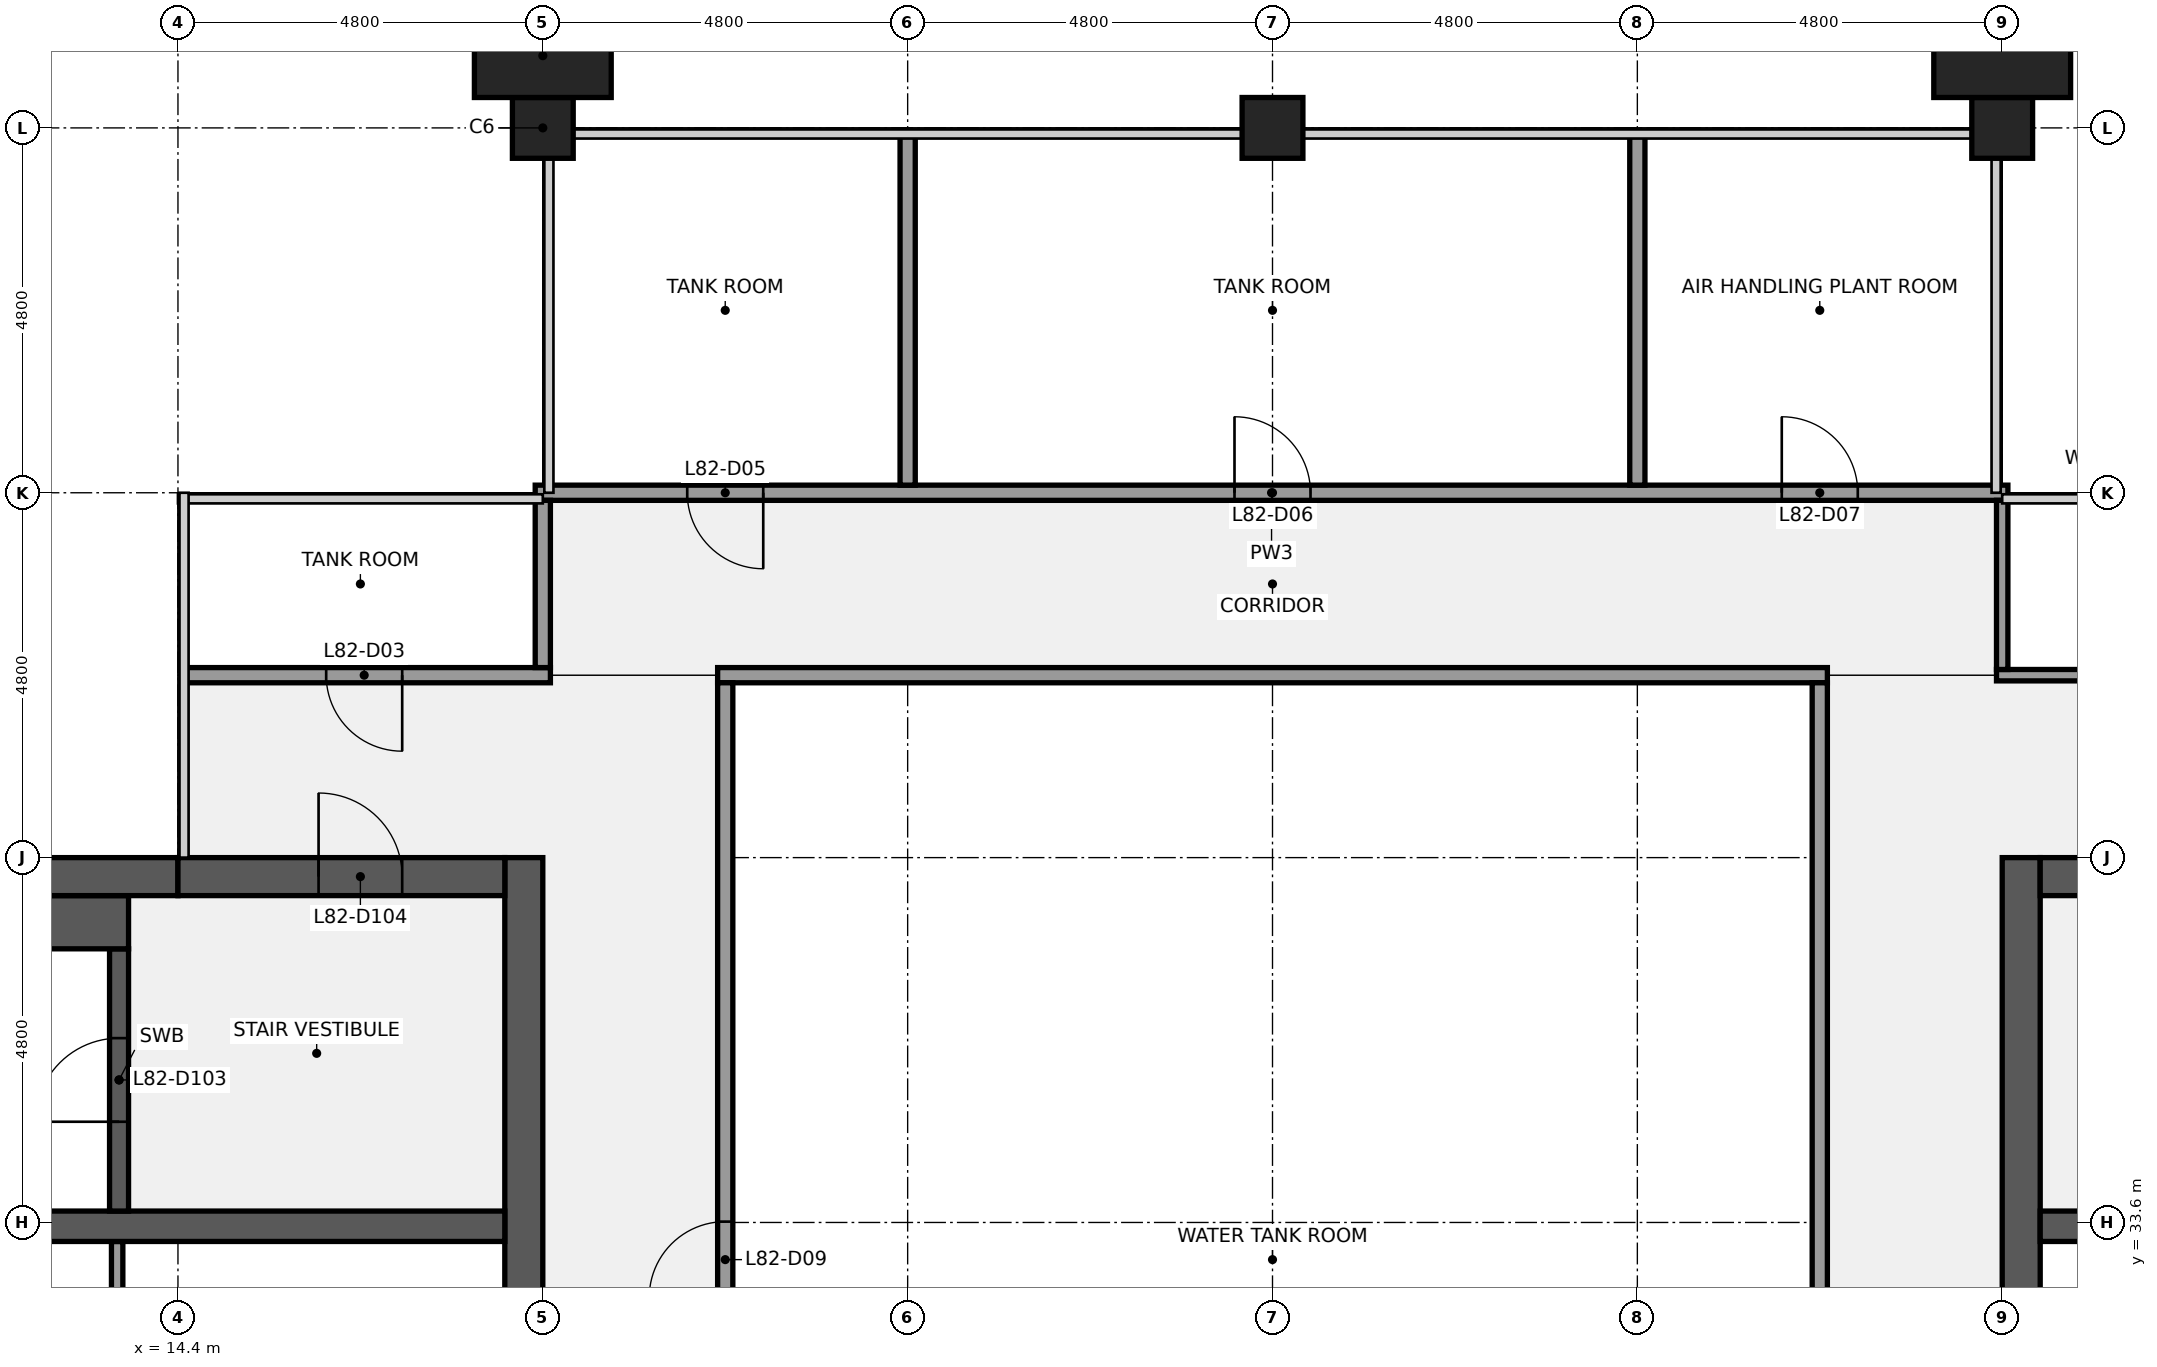
"""IFC4 building model, lengths in metres.
Left out: names, types, materials, properties, quantities, classifications, styles, units other than length and angle.
Written with IfcOpenShell. Run it as: python <this file> out.ifc"""

import sys

from ifc_helpers import new_model, si_unit, direction, frame, frame_2d, origin, origin_2d, place, context, subcontext, project, spatial, rectangle, extrude, element, fill, save


model = new_model("IFC4")
c1 = context("Model", 3, precision=1e-05, world=origin(), true_north=direction((0.0, 1.0)))
c2 = subcontext(c1, "Body", "Model", "MODEL_VIEW")
j1 = project(units=[si_unit("LENGTHUNIT", "METRE"), si_unit("PLANEANGLEUNIT", "RADIAN")], contexts=[c1])
p1 = place(None, origin())
s1 = spatial("IfcSite", under=j1, at=p1, CompositionType="ELEMENT")
p2 = place(p1, origin())
s2 = spatial("IfcBuilding", under=s1, at=p2, CompositionType="ELEMENT")
p3 = place(p2, frame((0.0, 0.0, 366.3)))
s3 = spatial("IfcBuildingStorey", under=s2, at=p3, CompositionType="ELEMENT", Elevation=366.3)
for number, where, z_axis, x_axis in (
    (1, (19.2, 48.0, 0.0), (0.0, 0.0, 1.0), (1.0, 0.0, 0.0)),
    (2, (28.8, 48.0, 0.0), (0.0, 0.0, 1.0), (1.0, 0.0, 0.0)),
    (3, (38.4, 48.0, 0.0), (0.0, 0.0, 1.0), (1.0, 0.0, 0.0)),
):
    element("IfcColumn", number, at=place(p3, frame(where, z_axis=z_axis, x_axis=x_axis)), inside=s3, PredefinedType="COLUMN", context=c2, shape_type="SweptSolid", body=[
        extrude(rectangle(XDim=0.8, YDim=0.8, at=origin_2d()), origin(), (0.0, 0.0, 1.0), 4.0),
    ])
p4 = place(p3, frame((18.95, 38.4, 0.0), z_axis=(0.0, 0.0, 1.0), x_axis=(0.0, -1.0, 0.0)))
e4 = element("IfcWall", 4, at=p4, inside=s3, PredefinedType="SHEAR", context=c2, shape_type="SweptSolid", body=[
    extrude(rectangle(XDim=28.8, YDim=0.5, at=frame_2d((14.4, 0.0))), origin(), (0.0, 0.0, 1.0), 3.75),
])
p5 = place(p4, frame((18.3, 0.0, 0.0)))
e5 = element("IfcOpeningElement", 5, at=p5, cuts=e4, PredefinedType="OPENING", context=c2, shape_type="SweptSolid", body=[
    extrude(rectangle(XDim=1.8, YDim=2.1, at=frame_2d((0.9, 1.05))), frame((0.0, 0.26, 0.0), z_axis=(0.0, -1.0, 0.0), x_axis=(1.0, 0.0, 0.0)), (0.0, 0.0, 1.0), 0.52),
])
p6 = place(p4, frame((8.7, 0.0, 0.0)))
e6 = element("IfcOpeningElement", 6, at=p6, cuts=e4, PredefinedType="OPENING", context=c2, shape_type="SweptSolid", body=[
    extrude(rectangle(XDim=1.8, YDim=2.1, at=frame_2d((0.9, 1.05))), frame((0.0, 0.26, 0.0), z_axis=(0.0, -1.0, 0.0), x_axis=(1.0, 0.0, 0.0)), (0.0, 0.0, 1.0), 0.52),
])
p7 = place(p3, frame((13.6, 30.75, 0.0), z_axis=(0.0, 0.0, 1.0), x_axis=(0.0, 1.0, 0.0)))
e7 = element("IfcWall", 7, at=p7, inside=s3, PredefinedType="PARTITIONING", context=c2, shape_type="SweptSolid", body=[
    extrude(rectangle(XDim=2.6, YDim=0.15, at=frame_2d((1.3, 0.0))), origin(), (0.0, 0.0, 1.0), 3.75),
])
p8 = place(p3, frame((0.5, 33.55, 0.0), z_axis=(0.0, 0.0, 1.0), x_axis=(1.0, 0.0, 0.0)))
e8 = element("IfcWall", 8, at=p8, inside=s3, PredefinedType="SHEAR", context=c2, shape_type="SweptSolid", body=[
    extrude(rectangle(XDim=18.2, YDim=0.4, at=frame_2d((9.1, 0.0))), origin(), (0.0, 0.0, 1.0), 3.75),
])
p9 = place(p3, frame((13.625, 33.75, 0.0), z_axis=(0.0, 0.0, 1.0), x_axis=(0.0, 1.0, 0.0)))
e9 = element("IfcWall", 9, at=p9, inside=s3, PredefinedType="SHEAR", context=c2, shape_type="SweptSolid", body=[
    extrude(rectangle(XDim=3.45, YDim=0.25, at=frame_2d((1.725, 0.0))), origin(), (0.0, 0.0, 1.0), 3.75),
])
p10 = place(p9, frame((1.175, 0.0, 0.0)))
e10 = element("IfcOpeningElement", 10, at=p10, cuts=e9, PredefinedType="OPENING", context=c2, shape_type="SweptSolid", body=[
    extrude(rectangle(XDim=1.1, YDim=2.1, at=frame_2d((0.55, 1.05))), frame((0.0, 0.135, 0.0), z_axis=(0.0, -1.0, 0.0), x_axis=(1.0, 0.0, 0.0)), (0.0, 0.0, 1.0), 0.27),
])
p11 = place(p3, frame((6.25, 37.55, 0.0), z_axis=(0.0, 0.0, 1.0), x_axis=(1.0, 0.0, 0.0)))
e11 = element("IfcWall", 11, at=p11, inside=s3, PredefinedType="SHEAR", context=c2, shape_type="SweptSolid", body=[
    extrude(rectangle(XDim=7.5, YDim=0.7, at=frame_2d((3.75, 0.0))), origin(), (0.0, 0.0, 1.0), 3.75),
])
p12 = place(p3, frame((0.5, 38.15, 0.0), z_axis=(0.0, 0.0, 1.0), x_axis=(1.0, 0.0, 0.0)))
e12 = element("IfcWall", 12, at=p12, inside=s3, PredefinedType="SHEAR", context=c2, shape_type="SweptSolid", body=[
    extrude(rectangle(XDim=13.9, YDim=0.5, at=frame_2d((6.95, 0.0))), origin(), (0.0, 0.0, 1.0), 3.75),
])
p13 = place(p3, frame((14.4, 38.15, 0.0), z_axis=(0.0, 0.0, 1.0), x_axis=(1.0, 0.0, 0.0)))
e13 = element("IfcWall", 13, at=p13, inside=s3, PredefinedType="SHEAR", context=c2, shape_type="SweptSolid", body=[
    extrude(rectangle(XDim=4.3, YDim=0.5, at=frame_2d((2.15, 0.0))), origin(), (0.0, 0.0, 1.0), 3.75),
])
p14 = place(p13, frame((1.85, 0.0, 0.0)))
e14 = element("IfcOpeningElement", 14, at=p14, cuts=e13, PredefinedType="OPENING", context=c2, shape_type="SweptSolid", body=[
    extrude(rectangle(XDim=1.1, YDim=2.1, at=frame_2d((0.55, 1.05))), frame((0.0, 0.26, 0.0), z_axis=(0.0, -1.0, 0.0), x_axis=(1.0, 0.0, 0.0)), (0.0, 0.0, 1.0), 0.52),
])
p15 = place(p3, frame((38.65, 9.6, 0.0), z_axis=(0.0, 0.0, 1.0), x_axis=(0.0, 1.0, 0.0)))
e15 = element("IfcWall", 15, at=p15, inside=s3, PredefinedType="SHEAR", context=c2, shape_type="SweptSolid", body=[
    extrude(rectangle(XDim=28.8, YDim=0.5, at=frame_2d((14.4, 0.0))), origin(), (0.0, 0.0, 1.0), 3.75),
])
p16 = place(p15, frame((8.7, 0.0, 0.0)))
e16 = element("IfcOpeningElement", 16, at=p16, cuts=e15, PredefinedType="OPENING", context=c2, shape_type="SweptSolid", body=[
    extrude(rectangle(XDim=1.8, YDim=2.1, at=frame_2d((0.9, 1.05))), frame((0.0, 0.26, 0.0), z_axis=(0.0, -1.0, 0.0), x_axis=(1.0, 0.0, 0.0)), (0.0, 0.0, 1.0), 0.52),
])
p17 = place(p15, frame((18.3, 0.0, 0.0)))
e17 = element("IfcOpeningElement", 17, at=p17, cuts=e15, PredefinedType="OPENING", context=c2, shape_type="SweptSolid", body=[
    extrude(rectangle(XDim=1.8, YDim=2.1, at=frame_2d((0.9, 1.05))), frame((0.0, 0.26, 0.0), z_axis=(0.0, -1.0, 0.0), x_axis=(1.0, 0.0, 0.0)), (0.0, 0.0, 1.0), 0.52),
])
p18 = place(p3, frame((38.9, 33.55, 0.0), z_axis=(0.0, 0.0, 1.0), x_axis=(1.0, 0.0, 0.0)))
e18 = element("IfcWall", 18, at=p18, inside=s3, PredefinedType="SHEAR", context=c2, shape_type="SweptSolid", body=[
    extrude(rectangle(XDim=18.2, YDim=0.4, at=frame_2d((9.1, 0.0))), origin(), (0.0, 0.0, 1.0), 3.75),
])
p19 = place(p3, frame((38.9, 38.15, 0.0), z_axis=(0.0, 0.0, 1.0), x_axis=(1.0, 0.0, 0.0)))
e19 = element("IfcWall", 19, at=p19, inside=s3, PredefinedType="SHEAR", context=c2, shape_type="SweptSolid", body=[
    extrude(rectangle(XDim=4.3, YDim=0.5, at=frame_2d((2.15, 0.0))), origin(), (0.0, 0.0, 1.0), 3.75),
])
p20 = place(p19, frame((1.35, 0.0, 0.0)))
e20 = element("IfcOpeningElement", 20, at=p20, cuts=e19, PredefinedType="OPENING", context=c2, shape_type="SweptSolid", body=[
    extrude(rectangle(XDim=1.1, YDim=2.1, at=frame_2d((0.55, 1.05))), frame((0.0, 0.26, 0.0), z_axis=(0.0, -1.0, 0.0), x_axis=(1.0, 0.0, 0.0)), (0.0, 0.0, 1.0), 0.52),
])
p21 = place(p3, frame((38.325, 40.8, 0.0), z_axis=(0.0, 0.0, 1.0), x_axis=(1.0, 0.0, 0.0)))
e21 = element("IfcWall", 21, at=p21, inside=s3, PredefinedType="PARTITIONING", context=c2, shape_type="SweptSolid", body=[
    extrude(rectangle(XDim=4.775, YDim=0.15, at=frame_2d((2.388, 0.0))), origin(), (0.0, 0.0, 1.0), 2.759),
])
p22 = place(p21, frame((1.925, 0.0, 0.0)))
e22 = element("IfcOpeningElement", 22, at=p22, cuts=e21, PredefinedType="OPENING", context=c2, shape_type="SweptSolid", body=[
    extrude(rectangle(XDim=1.0, YDim=2.1, at=frame_2d((0.5, 1.05))), frame((0.0, 0.085, 0.0), z_axis=(0.0, -1.0, 0.0), x_axis=(1.0, 0.0, 0.0)), (0.0, 0.0, 1.0), 0.17),
])
p23 = place(p3, frame((14.5, 40.8, 0.0), z_axis=(0.0, 0.0, 1.0), x_axis=(1.0, 0.0, 0.0)))
e23 = element("IfcWall", 23, at=p23, inside=s3, PredefinedType="PARTITIONING", context=c2, shape_type="SweptSolid", body=[
    extrude(rectangle(XDim=4.8, YDim=0.2, at=frame_2d((2.4, 0.0))), origin(), (0.0, 0.0, 1.0), 2.759),
])
p24 = place(p23, frame((1.85, 0.0, 0.0)))
e24 = element("IfcOpeningElement", 24, at=p24, cuts=e23, PredefinedType="OPENING", context=c2, shape_type="SweptSolid", body=[
    extrude(rectangle(XDim=1.0, YDim=2.1, at=frame_2d((0.5, 1.05))), frame((0.0, 0.11, 0.0), z_axis=(0.0, -1.0, 0.0), x_axis=(1.0, 0.0, 0.0)), (0.0, 0.0, 1.0), 0.22),
])
p25 = place(p3, frame((21.5, 40.8, 0.0), z_axis=(0.0, 0.0, 1.0), x_axis=(1.0, 0.0, 0.0)))
e25 = element("IfcWall", 25, at=p25, inside=s3, PredefinedType="PARTITIONING", context=c2, shape_type="SweptSolid", body=[
    extrude(rectangle(XDim=14.6, YDim=0.2, at=frame_2d((7.3, 0.0))), origin(), (0.0, 0.0, 1.0), 2.759),
])
p26 = place(p3, frame((19.1, 43.2, 0.0), z_axis=(0.0, 0.0, 1.0), x_axis=(1.0, 0.0, 0.0)))
e26 = element("IfcWall", 26, at=p26, inside=s3, PredefinedType="PARTITIONING", context=c2, shape_type="SweptSolid", body=[
    extrude(rectangle(XDim=19.375, YDim=0.2, at=frame_2d((9.688, 0.0))), origin(), (0.0, 0.0, 1.0), 2.759),
])
p27 = place(p26, frame((2.0, 0.0, 0.0)))
e27 = element("IfcOpeningElement", 27, at=p27, cuts=e26, PredefinedType="OPENING", context=c2, shape_type="SweptSolid", body=[
    extrude(rectangle(XDim=1.0, YDim=2.1, at=frame_2d((0.5, 1.05))), frame((0.0, 0.11, 0.0), z_axis=(0.0, -1.0, 0.0), x_axis=(1.0, 0.0, 0.0)), (0.0, 0.0, 1.0), 0.22),
])
p28 = place(p26, frame((9.2, 0.0, 0.0)))
e28 = element("IfcOpeningElement", 28, at=p28, cuts=e26, PredefinedType="OPENING", context=c2, shape_type="SweptSolid", body=[
    extrude(rectangle(XDim=1.0, YDim=2.1, at=frame_2d((0.5, 1.05))), frame((0.0, 0.11, 0.0), z_axis=(0.0, -1.0, 0.0), x_axis=(1.0, 0.0, 0.0)), (0.0, 0.0, 1.0), 0.22),
])
p29 = place(p26, frame((16.4, 0.0, 0.0)))
e29 = element("IfcOpeningElement", 29, at=p29, cuts=e26, PredefinedType="OPENING", context=c2, shape_type="SweptSolid", body=[
    extrude(rectangle(XDim=1.0, YDim=2.1, at=frame_2d((0.5, 1.05))), frame((0.0, 0.11, 0.0), z_axis=(0.0, -1.0, 0.0), x_axis=(1.0, 0.0, 0.0)), (0.0, 0.0, 1.0), 0.22),
])
p30 = place(p3, frame((19.2, 40.9, 0.0), z_axis=(0.0, 0.0, 1.0), x_axis=(0.0, 1.0, 0.0)))
e30 = element("IfcWall", 30, at=p30, inside=s3, PredefinedType="PARTITIONING", context=c2, shape_type="SweptSolid", body=[
    extrude(rectangle(XDim=2.2, YDim=0.2, at=frame_2d((1.1, 0.0))), origin(), (0.0, 0.0, 1.0), 2.759),
])
p31 = place(p3, frame((21.6, 25.522, 0.0), z_axis=(0.0, 0.0, 1.0), x_axis=(0.0, 1.0, 0.0)))
e31 = element("IfcWall", 31, at=p31, inside=s3, PredefinedType="PARTITIONING", context=c2, shape_type="SweptSolid", body=[
    extrude(rectangle(XDim=15.178, YDim=0.2, at=frame_2d((7.589, 0.0))), origin(), (0.0, 0.0, 1.0), 2.759),
])
p32 = place(p31, frame((7.089, 0.0, 0.0)))
e32 = element("IfcOpeningElement", 32, at=p32, cuts=e31, PredefinedType="OPENING", context=c2, shape_type="SweptSolid", body=[
    extrude(rectangle(XDim=1.0, YDim=2.1, at=frame_2d((0.5, 1.05))), frame((0.0, 0.11, 0.0), z_axis=(0.0, -1.0, 0.0), x_axis=(1.0, 0.0, 0.0)), (0.0, 0.0, 1.0), 0.22),
])
for number, where, z_axis, x_axis in (
    (33, (24.0, 43.3, 0.0), (0.0, 0.0, 1.0), (0.0, 1.0, 0.0)),
    (34, (33.6, 43.3, 0.0), (0.0, 0.0, 1.0), (0.0, 1.0, 0.0)),
):
    element("IfcWall", number, at=place(p3, frame(where, z_axis=z_axis, x_axis=x_axis)), inside=s3, PredefinedType="PARTITIONING", context=c2, shape_type="SweptSolid", body=[
        extrude(rectangle(XDim=4.6, YDim=0.2, at=frame_2d((2.3, 0.0))), origin(), (0.0, 0.0, 1.0), 2.759),
    ])
p33 = place(p3, frame((36.0, 25.522, 0.0), z_axis=(0.0, 0.0, 1.0), x_axis=(0.0, 1.0, 0.0)))
e35 = element("IfcWall", 35, at=p33, inside=s3, PredefinedType="PARTITIONING", context=c2, shape_type="SweptSolid", body=[
    extrude(rectangle(XDim=15.178, YDim=0.2, at=frame_2d((7.589, 0.0))), origin(), (0.0, 0.0, 1.0), 2.759),
])
p34 = place(p3, frame((38.4, 40.875, 0.0), z_axis=(0.0, 0.0, 1.0), x_axis=(0.0, 1.0, 0.0)))
e36 = element("IfcWall", 36, at=p34, inside=s3, PredefinedType="PARTITIONING", context=c2, shape_type="SweptSolid", body=[
    extrude(rectangle(XDim=2.225, YDim=0.15, at=frame_2d((1.113, 0.0))), origin(), (0.0, 0.0, 1.0), 2.759),
])
for number, where, z_axis, x_axis in (
    (37, (19.2, 48.95, 0.0), (0.0, 0.0, 1.0), (1.0, 0.0, 0.0)),
    (38, (38.4, 48.95, 0.0), (0.0, 0.0, 1.0), (1.0, 0.0, 0.0)),
):
    element("IfcColumn", number, at=place(p3, frame(where, z_axis=z_axis, x_axis=x_axis)), inside=s3, PredefinedType="PILASTER", context=c2, shape_type="SweptSolid", body=[
        extrude(rectangle(XDim=1.8, YDim=1.1, at=origin_2d()), origin(), (0.0, 0.0, 1.0), 4.0),
    ])
p35 = place(p10, origin())
e39 = element("IfcDoor", 39, at=p35, inside=s3, OperationType="SINGLE_SWING_LEFT", PredefinedType="DOOR", context=c2, shape_type="SweptSolid", body=[
    extrude(rectangle(XDim=1.1, YDim=2.1, at=frame_2d((0.55, 1.05))), frame((0.0, 0.025, 0.0), z_axis=(0.0, -1.0, 0.0), x_axis=(1.0, 0.0, 0.0)), (0.0, 0.0, 1.0), 0.05),
])
fill(e10, e39)
p36 = place(p14, origin())
e40 = element("IfcDoor", 40, at=p36, inside=s3, OperationType="SINGLE_SWING_LEFT", PredefinedType="DOOR", context=c2, shape_type="SweptSolid", body=[
    extrude(rectangle(XDim=1.1, YDim=2.1, at=frame_2d((0.55, 1.05))), frame((0.0, 0.025, 0.0), z_axis=(0.0, -1.0, 0.0), x_axis=(1.0, 0.0, 0.0)), (0.0, 0.0, 1.0), 0.05),
])
fill(e14, e40)
p37 = place(p24, origin())
e41 = element("IfcDoor", 41, at=p37, inside=s3, OperationType="SINGLE_SWING_RIGHT", PredefinedType="DOOR", context=c2, shape_type="SweptSolid", body=[
    extrude(rectangle(XDim=1.0, YDim=2.1, at=frame_2d((0.5, 1.05))), frame((0.0, 0.025, 0.0), z_axis=(0.0, -1.0, 0.0), x_axis=(1.0, 0.0, 0.0)), (0.0, 0.0, 1.0), 0.05),
])
fill(e24, e41)
p38 = place(p27, origin())
e42 = element("IfcDoor", 42, at=p38, inside=s3, OperationType="SINGLE_SWING_RIGHT", PredefinedType="DOOR", context=c2, shape_type="SweptSolid", body=[
    extrude(rectangle(XDim=1.0, YDim=2.1, at=frame_2d((0.5, 1.05))), frame((0.0, 0.025, 0.0), z_axis=(0.0, -1.0, 0.0), x_axis=(1.0, 0.0, 0.0)), (0.0, 0.0, 1.0), 0.05),
])
fill(e27, e42)
p39 = place(p28, origin())
e43 = element("IfcDoor", 43, at=p39, inside=s3, OperationType="SINGLE_SWING_LEFT", PredefinedType="DOOR", context=c2, shape_type="SweptSolid", body=[
    extrude(rectangle(XDim=1.0, YDim=2.1, at=frame_2d((0.5, 1.05))), frame((0.0, 0.025, 0.0), z_axis=(0.0, -1.0, 0.0), x_axis=(1.0, 0.0, 0.0)), (0.0, 0.0, 1.0), 0.05),
])
fill(e28, e43)
p40 = place(p29, origin())
e44 = element("IfcDoor", 44, at=p40, inside=s3, OperationType="SINGLE_SWING_LEFT", PredefinedType="DOOR", context=c2, shape_type="SweptSolid", body=[
    extrude(rectangle(XDim=1.0, YDim=2.1, at=frame_2d((0.5, 1.05))), frame((0.0, 0.025, 0.0), z_axis=(0.0, -1.0, 0.0), x_axis=(1.0, 0.0, 0.0)), (0.0, 0.0, 1.0), 0.05),
])
fill(e29, e44)
p41 = place(p32, origin())
e45 = element("IfcDoor", 45, at=p41, inside=s3, OperationType="SINGLE_SWING_LEFT", PredefinedType="DOOR", context=c2, shape_type="SweptSolid", body=[
    extrude(rectangle(XDim=1.0, YDim=2.1, at=frame_2d((0.5, 1.05))), frame((0.0, 0.025, 0.0), z_axis=(0.0, -1.0, 0.0), x_axis=(1.0, 0.0, 0.0)), (0.0, 0.0, 1.0), 0.05),
])
fill(e32, e45)
save(model, sys.argv[1])
